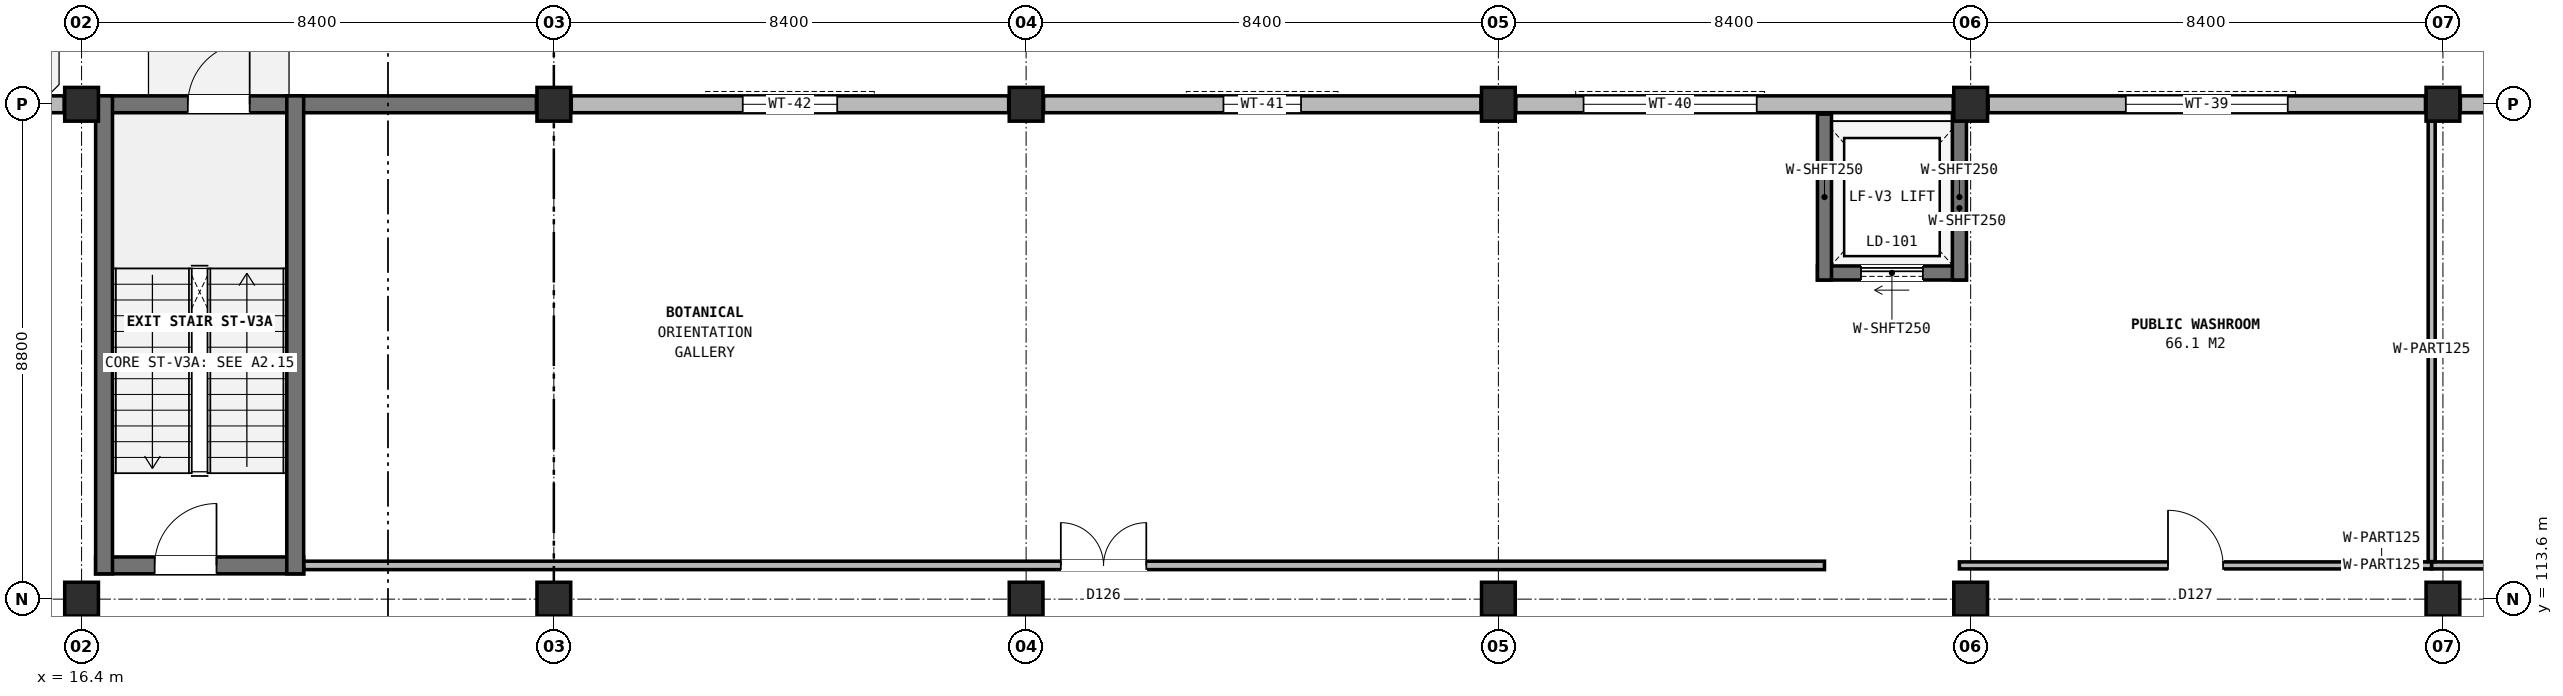
"""IFC4 building model, lengths in metres.
Left out: names, types, materials, properties, quantities, classifications, styles, units other than length and angle.
Written with IfcOpenShell. Run it as: python <this file> out.ifc"""

import sys

from ifc_helpers import new_model, si_unit, direction, frame, frame_2d, origin, origin_2d, place, context, subcontext, project, spatial, rectangle, extrude, element, fill, save


model = new_model("IFC4")
c1 = context("Model", 3, precision=1e-05, world=origin(), true_north=direction((0.0, 1.0)))
c2 = subcontext(c1, "Body", "Model", "MODEL_VIEW")
j1 = project(units=[si_unit("LENGTHUNIT", "METRE"), si_unit("PLANEANGLEUNIT", "RADIAN")], contexts=[c1])
p1 = place(None, origin())
s1 = spatial("IfcSite", under=j1, at=p1, CompositionType="ELEMENT")
p2 = place(p1, origin())
s2 = spatial("IfcBuilding", under=s1, at=p2, CompositionType="ELEMENT")
p3 = place(p2, origin())
s3 = spatial("IfcBuildingStorey", under=s2, at=p3, CompositionType="ELEMENT", Elevation=0.0)
for number, where, z_axis, x_axis in (
    (1, (16.4, 113.6, 0.0), (0.0, 0.0, 1.0), (1.0, 0.0, 0.0)),
    (2, (16.4, 122.4, 0.0), (0.0, 0.0, 1.0), (1.0, 0.0, 0.0)),
    (3, (24.8, 113.6, 0.0), (0.0, 0.0, 1.0), (1.0, 0.0, 0.0)),
    (4, (24.8, 122.4, 0.0), (0.0, 0.0, 1.0), (1.0, 0.0, 0.0)),
    (5, (33.2, 113.6, 0.0), (0.0, 0.0, 1.0), (1.0, 0.0, 0.0)),
    (6, (33.2, 122.4, 0.0), (0.0, 0.0, 1.0), (1.0, 0.0, 0.0)),
    (7, (41.6, 113.6, 0.0), (0.0, 0.0, 1.0), (1.0, 0.0, 0.0)),
    (8, (41.6, 122.4, 0.0), (0.0, 0.0, 1.0), (1.0, 0.0, 0.0)),
    (9, (50.0, 113.6, 0.0), (0.0, 0.0, 1.0), (1.0, 0.0, 0.0)),
    (10, (50.0, 122.4, 0.0), (0.0, 0.0, 1.0), (1.0, 0.0, 0.0)),
    (11, (58.4, 113.6, 0.0), (0.0, 0.0, 1.0), (1.0, 0.0, 0.0)),
    (12, (58.4, 122.4, 0.0), (0.0, 0.0, 1.0), (1.0, 0.0, 0.0)),
):
    element("IfcColumn", number, at=place(p3, frame(where, z_axis=z_axis, x_axis=x_axis)), inside=s3, PredefinedType="COLUMN", context=c2, shape_type="SweptSolid", body=[
        extrude(rectangle(XDim=0.6, YDim=0.6, at=origin_2d()), origin(), (0.0, 0.0, 1.0), 4.8),
    ])
p4 = place(p3, frame((66.49, 122.4, 0.0), z_axis=(0.0, 0.0, 1.0), x_axis=(-1.0, 0.0, 0.0)))
e13 = element("IfcWall", 13, at=p4, inside=s3, PredefinedType="SOLIDWALL", context=c2, shape_type="SweptSolid", body=[
    extrude(rectangle(XDim=7.78, YDim=0.3, at=frame_2d((3.89, 0.0))), origin(), (0.0, 0.0, 1.0), 4.05),
])
p5 = place(p4, frame((2.55, 0.0, 0.9)))
e14 = element("IfcOpeningElement", 14, at=p5, cuts=e13, PredefinedType="OPENING", context=c2, shape_type="SweptSolid", body=[
    extrude(rectangle(XDim=2.68, YDim=2.12, at=frame_2d((1.34, 1.06))), frame((0.0, 0.16, 0.0), z_axis=(0.0, -1.0, 0.0), x_axis=(1.0, 0.0, 0.0)), (0.0, 0.0, 1.0), 0.32),
])
p6 = place(p3, frame((58.09, 122.4, 0.0), z_axis=(0.0, 0.0, 1.0), x_axis=(-1.0, 0.0, 0.0)))
e15 = element("IfcWall", 15, at=p6, inside=s3, PredefinedType="SOLIDWALL", context=c2, shape_type="SweptSolid", body=[
    extrude(rectangle(XDim=7.78, YDim=0.3, at=frame_2d((3.89, 0.0))), origin(), (0.0, 0.0, 1.0), 4.05),
])
p7 = place(p6, frame((2.45, 0.0, 0.9)))
e16 = element("IfcOpeningElement", 16, at=p7, cuts=e15, PredefinedType="OPENING", context=c2, shape_type="SweptSolid", body=[
    extrude(rectangle(XDim=2.88, YDim=2.14, at=frame_2d((1.44, 1.07))), frame((0.0, 0.16, 0.0), z_axis=(0.0, -1.0, 0.0), x_axis=(1.0, 0.0, 0.0)), (0.0, 0.0, 1.0), 0.32),
])
p8 = place(p3, frame((49.69, 122.4, 0.0), z_axis=(0.0, 0.0, 1.0), x_axis=(-1.0, 0.0, 0.0)))
e17 = element("IfcWall", 17, at=p8, inside=s3, PredefinedType="SOLIDWALL", context=c2, shape_type="SweptSolid", body=[
    extrude(rectangle(XDim=7.78, YDim=0.3, at=frame_2d((3.89, 0.0))), origin(), (0.0, 0.0, 1.0), 4.05),
])
p9 = place(p8, frame((3.495, 0.0, 0.9)))
e18 = element("IfcOpeningElement", 18, at=p9, cuts=e17, PredefinedType="OPENING", context=c2, shape_type="SweptSolid", body=[
    extrude(rectangle(XDim=3.08, YDim=2.18, at=frame_2d((1.54, 1.09))), frame((0.0, 0.16, 0.0), z_axis=(0.0, -1.0, 0.0), x_axis=(1.0, 0.0, 0.0)), (0.0, 0.0, 1.0), 0.32),
])
p10 = place(p3, frame((41.29, 122.4, 0.0), z_axis=(0.0, 0.0, 1.0), x_axis=(-1.0, 0.0, 0.0)))
e19 = element("IfcWall", 19, at=p10, inside=s3, PredefinedType="SOLIDWALL", context=c2, shape_type="SweptSolid", body=[
    extrude(rectangle(XDim=7.78, YDim=0.3, at=frame_2d((3.89, 0.0))), origin(), (0.0, 0.0, 1.0), 4.05),
])
p11 = place(p10, frame((3.2, 0.0, 0.9)))
e20 = element("IfcOpeningElement", 20, at=p11, cuts=e19, PredefinedType="OPENING", context=c2, shape_type="SweptSolid", body=[
    extrude(rectangle(XDim=1.38, YDim=2.24, at=frame_2d((0.69, 1.12))), frame((0.0, 0.16, 0.0), z_axis=(0.0, -1.0, 0.0), x_axis=(1.0, 0.0, 0.0)), (0.0, 0.0, 1.0), 0.32),
])
p12 = place(p3, frame((32.89, 122.4, 0.0), z_axis=(0.0, 0.0, 1.0), x_axis=(-1.0, 0.0, 0.0)))
e21 = element("IfcWall", 21, at=p12, inside=s3, PredefinedType="SOLIDWALL", context=c2, shape_type="SweptSolid", body=[
    extrude(rectangle(XDim=7.78, YDim=0.3, at=frame_2d((3.89, 0.0))), origin(), (0.0, 0.0, 1.0), 4.05),
])
p13 = place(p12, frame((3.05, 0.0, 0.9)))
e22 = element("IfcOpeningElement", 22, at=p13, cuts=e21, PredefinedType="OPENING", context=c2, shape_type="SweptSolid", body=[
    extrude(rectangle(XDim=1.68, YDim=2.28, at=frame_2d((0.84, 1.14))), frame((0.0, 0.16, 0.0), z_axis=(0.0, -1.0, 0.0), x_axis=(1.0, 0.0, 0.0)), (0.0, 0.0, 1.0), 0.32),
])
p14 = place(p3, frame((24.49, 122.4, 0.0), z_axis=(0.0, 0.0, 1.0), x_axis=(-1.0, 0.0, 0.0)))
e23 = element("IfcWall", 23, at=p14, inside=s3, PredefinedType="SHEAR", context=c2, shape_type="SweptSolid", body=[
    extrude(rectangle(XDim=7.78, YDim=0.3, at=frame_2d((3.89, 0.0))), origin(), (0.0, 0.0, 1.0), 4.05),
])
p15 = place(p14, frame((5.1, 0.0, 0.0)))
e24 = element("IfcOpeningElement", 24, at=p15, cuts=e23, PredefinedType="OPENING", context=c2, shape_type="SweptSolid", body=[
    extrude(rectangle(XDim=1.1, YDim=2.2, at=frame_2d((0.55, 1.1))), frame((0.0, 0.16, 0.0), z_axis=(0.0, -1.0, 0.0), x_axis=(1.0, 0.0, 0.0)), (0.0, 0.0, 1.0), 0.32),
])
p16 = place(p3, frame((16.09, 122.4, 0.0), z_axis=(0.0, 0.0, 1.0), x_axis=(-1.0, 0.0, 0.0)))
e25 = element("IfcWall", 25, at=p16, inside=s3, PredefinedType="SOLIDWALL", context=c2, shape_type="SweptSolid", body=[
    extrude(rectangle(XDim=7.78, YDim=0.3, at=frame_2d((3.89, 0.0))), origin(), (0.0, 0.0, 1.0), 4.15),
])
p17 = place(p16, frame((1.49, 0.0, 0.0)))
e26 = element("IfcOpeningElement", 26, at=p17, cuts=e25, PredefinedType="OPENING", context=c2, shape_type="SweptSolid", body=[
    extrude(rectangle(XDim=4.8, YDim=3.2, at=frame_2d((2.4, 1.6))), frame((0.0, 0.16, 0.0), z_axis=(0.0, -1.0, 0.0), x_axis=(1.0, 0.0, 0.0)), (0.0, 0.0, 1.0), 0.32),
])
p18 = place(p3, frame((16.65, 114.2, 0.0), z_axis=(0.0, 0.0, 1.0), x_axis=(1.0, 0.0, 0.0)))
e27 = element("IfcWall", 27, at=p18, inside=s3, PredefinedType="SHEAR", context=c2, shape_type="SweptSolid", body=[
    extrude(rectangle(XDim=3.7, YDim=0.3, at=frame_2d((1.85, 0.0))), origin(), (0.0, 0.0, 1.0), 4.8),
])
p19 = place(p18, frame((1.05, 0.0, 0.0)))
e28 = element("IfcOpeningElement", 28, at=p19, cuts=e27, PredefinedType="OPENING", context=c2, shape_type="SweptSolid", body=[
    extrude(rectangle(XDim=1.1, YDim=2.2, at=frame_2d((0.55, 1.1))), frame((0.0, 0.16, 0.0), z_axis=(0.0, -1.0, 0.0), x_axis=(1.0, 0.0, 0.0)), (0.0, 0.0, 1.0), 0.32),
])
for number, where, z_axis, x_axis in (
    (29, (16.8, 114.05, 0.0), (0.0, 0.0, 1.0), (0.0, 1.0, 0.0)),
    (30, (20.2, 114.05, 0.0), (0.0, 0.0, 1.0), (0.0, 1.0, 0.0)),
):
    element("IfcWall", number, at=place(p3, frame(where, z_axis=z_axis, x_axis=x_axis)), inside=s3, PredefinedType="SHEAR", context=c2, shape_type="SweptSolid", body=[
        extrude(rectangle(XDim=8.5, YDim=0.3, at=frame_2d((4.25, 0.0))), origin(), (0.0, 0.0, 1.0), 4.8),
    ])
p20 = place(p3, frame((47.275, 119.4, 0.0), z_axis=(0.0, 0.0, 1.0), x_axis=(1.0, 0.0, 0.0)))
e31 = element("IfcWall", 31, at=p20, inside=s3, PredefinedType="SOLIDWALL", context=c2, shape_type="SweptSolid", body=[
    extrude(rectangle(XDim=2.65, YDim=0.25, at=frame_2d((1.325, 0.0))), origin(), (0.0, 0.0, 1.0), 4.48),
])
p21 = place(p20, frame((0.775, 0.0, 0.0)))
e32 = element("IfcOpeningElement", 32, at=p21, cuts=e31, PredefinedType="OPENING", context=c2, shape_type="SweptSolid", body=[
    extrude(rectangle(XDim=1.1, YDim=2.2, at=frame_2d((0.55, 1.1))), frame((0.0, 0.135, 0.0), z_axis=(0.0, -1.0, 0.0), x_axis=(1.0, 0.0, 0.0)), (0.0, 0.0, 1.0), 0.27),
])
for number, where, z_axis, x_axis in (
    (33, (47.4, 119.275, 0.0), (0.0, 0.0, 1.0), (0.0, 1.0, 0.0)),
    (34, (49.8, 119.275, 0.0), (0.0, 0.0, 1.0), (0.0, 1.0, 0.0)),
):
    element("IfcWall", number, at=place(p3, frame(where, z_axis=z_axis, x_axis=x_axis)), inside=s3, PredefinedType="SOLIDWALL", context=c2, shape_type="SweptSolid", body=[
        extrude(rectangle(XDim=2.95, YDim=0.25, at=frame_2d((1.475, 0.0))), origin(), (0.0, 0.0, 1.0), 4.48),
    ])
p22 = place(p3, frame((20.355, 114.2, 0.0), z_axis=(0.0, 0.0, 1.0), x_axis=(1.0, 0.0, 0.0)))
e35 = element("IfcWall", 35, at=p22, inside=s3, PredefinedType="PARTITIONING", context=c2, shape_type="SweptSolid", body=[
    extrude(rectangle(XDim=27.045, YDim=0.15, at=frame_2d((13.522, 0.0))), origin(), (0.0, 0.0, 1.0), 4.465),
])
p23 = place(p22, frame((13.462, 0.0, 0.0)))
e36 = element("IfcOpeningElement", 36, at=p23, cuts=e35, PredefinedType="OPENING", context=c2, shape_type="SweptSolid", body=[
    extrude(rectangle(XDim=1.52, YDim=2.28, at=frame_2d((0.76, 1.14))), frame((0.0, 0.085, 0.0), z_axis=(0.0, -1.0, 0.0), x_axis=(1.0, 0.0, 0.0)), (0.0, 0.0, 1.0), 0.17),
])
p24 = place(p3, frame((49.8, 114.2, 0.0), z_axis=(0.0, 0.0, 1.0), x_axis=(1.0, 0.0, 0.0)))
e37 = element("IfcWall", 37, at=p24, inside=s3, PredefinedType="PARTITIONING", context=c2, shape_type="SweptSolid", body=[
    extrude(rectangle(XDim=8.4, YDim=0.125, at=frame_2d((4.2, 0.0))), origin(), (0.0, 0.0, 1.0), 4.465),
])
p25 = place(p24, frame((3.71, 0.0, 0.0)))
e38 = element("IfcOpeningElement", 38, at=p25, cuts=e37, PredefinedType="OPENING", context=c2, shape_type="SweptSolid", body=[
    extrude(rectangle(XDim=0.98, YDim=2.1, at=frame_2d((0.49, 1.05))), frame((0.0, 0.073, 0.0), z_axis=(0.0, -1.0, 0.0), x_axis=(1.0, 0.0, 0.0)), (0.0, 0.0, 1.0), 0.145),
])
p26 = place(p3, frame((58.2, 114.2, 0.0), z_axis=(0.0, 0.0, 1.0), x_axis=(1.0, 0.0, 0.0)))
e39 = element("IfcWall", 39, at=p26, inside=s3, PredefinedType="PARTITIONING", context=c2, shape_type="SweptSolid", body=[
    extrude(rectangle(XDim=8.4, YDim=0.125, at=frame_2d((4.2, 0.0))), origin(), (0.0, 0.0, 1.0), 4.465),
])
p27 = place(p26, frame((3.71, 0.0, 0.0)))
e40 = element("IfcOpeningElement", 40, at=p27, cuts=e39, PredefinedType="OPENING", context=c2, shape_type="SweptSolid", body=[
    extrude(rectangle(XDim=0.98, YDim=2.1, at=frame_2d((0.49, 1.05))), frame((0.0, 0.073, 0.0), z_axis=(0.0, -1.0, 0.0), x_axis=(1.0, 0.0, 0.0)), (0.0, 0.0, 1.0), 0.145),
])
p28 = place(p3, frame((58.2, 114.268, 0.0), z_axis=(0.0, 0.0, 1.0), x_axis=(0.0, 1.0, 0.0)))
e41 = element("IfcWall", 41, at=p28, inside=s3, PredefinedType="PARTITIONING", context=c2, shape_type="SweptSolid", body=[
    extrude(rectangle(XDim=7.833, YDim=0.125, at=frame_2d((3.916, 0.0))), origin(), (0.0, 0.0, 1.0), 4.045),
])
p29 = place(p7, origin())
e42 = element("IfcWindow", 42, at=p29, inside=s3, PartitioningType="SINGLE_PANEL", PredefinedType="WINDOW", context=c2, shape_type="SweptSolid", body=[
    extrude(rectangle(XDim=2.88, YDim=2.14, at=frame_2d((1.44, 1.07))), frame((0.0, 0.03, 0.0), z_axis=(0.0, -1.0, 0.0), x_axis=(1.0, 0.0, 0.0)), (0.0, 0.0, 1.0), 0.06),
])
fill(e16, e42)
p30 = place(p9, origin())
e43 = element("IfcWindow", 43, at=p30, inside=s3, PartitioningType="SINGLE_PANEL", PredefinedType="WINDOW", context=c2, shape_type="SweptSolid", body=[
    extrude(rectangle(XDim=3.08, YDim=2.18, at=frame_2d((1.54, 1.09))), frame((0.0, 0.03, 0.0), z_axis=(0.0, -1.0, 0.0), x_axis=(1.0, 0.0, 0.0)), (0.0, 0.0, 1.0), 0.06),
])
fill(e18, e43)
p31 = place(p11, origin())
e44 = element("IfcWindow", 44, at=p31, inside=s3, PartitioningType="SINGLE_PANEL", PredefinedType="WINDOW", context=c2, shape_type="SweptSolid", body=[
    extrude(rectangle(XDim=1.38, YDim=2.24, at=frame_2d((0.69, 1.12))), frame((0.0, 0.03, 0.0), z_axis=(0.0, -1.0, 0.0), x_axis=(1.0, 0.0, 0.0)), (0.0, 0.0, 1.0), 0.06),
])
fill(e20, e44)
p32 = place(p13, origin())
e45 = element("IfcWindow", 45, at=p32, inside=s3, PartitioningType="SINGLE_PANEL", PredefinedType="WINDOW", context=c2, shape_type="SweptSolid", body=[
    extrude(rectangle(XDim=1.68, YDim=2.28, at=frame_2d((0.84, 1.14))), frame((0.0, 0.03, 0.0), z_axis=(0.0, -1.0, 0.0), x_axis=(1.0, 0.0, 0.0)), (0.0, 0.0, 1.0), 0.06),
])
fill(e22, e45)
p33 = place(p15, frame((1.1, 0.0, 0.0), z_axis=(0.0, 0.0, 1.0), x_axis=(-1.0, 0.0, 0.0)))
e46 = element("IfcDoor", 46, at=p33, inside=s3, OperationType="SINGLE_SWING_LEFT", PredefinedType="DOOR", context=c2, shape_type="SweptSolid", body=[
    extrude(rectangle(XDim=1.1, YDim=2.2, at=frame_2d((0.55, 1.1))), frame((0.0, 0.025, 0.0), z_axis=(0.0, -1.0, 0.0), x_axis=(1.0, 0.0, 0.0)), (0.0, 0.0, 1.0), 0.05),
])
fill(e24, e46)
p34 = place(p19, origin())
e47 = element("IfcDoor", 47, at=p34, inside=s3, OperationType="SINGLE_SWING_RIGHT", PredefinedType="DOOR", context=c2, shape_type="SweptSolid", body=[
    extrude(rectangle(XDim=1.1, YDim=2.2, at=frame_2d((0.55, 1.1))), frame((0.0, 0.025, 0.0), z_axis=(0.0, -1.0, 0.0), x_axis=(1.0, 0.0, 0.0)), (0.0, 0.0, 1.0), 0.05),
])
fill(e28, e47)
p35 = place(p21, origin())
e48 = element("IfcDoor", 48, at=p35, inside=s3, OperationType="SLIDING_TO_LEFT", PredefinedType="DOOR", context=c2, shape_type="SweptSolid", body=[
    extrude(rectangle(XDim=1.1, YDim=2.2, at=frame_2d((0.55, 1.1))), frame((0.0, 0.025, 0.0), z_axis=(0.0, -1.0, 0.0), x_axis=(1.0, 0.0, 0.0)), (0.0, 0.0, 1.0), 0.05),
])
fill(e32, e48)
p36 = place(p23, origin())
e49 = element("IfcDoor", 49, at=p36, inside=s3, OperationType="DOUBLE_DOOR_SINGLE_SWING", PredefinedType="DOOR", context=c2, shape_type="SweptSolid", body=[
    extrude(rectangle(XDim=1.52, YDim=2.28, at=frame_2d((0.76, 1.14))), frame((0.0, 0.025, 0.0), z_axis=(0.0, -1.0, 0.0), x_axis=(1.0, 0.0, 0.0)), (0.0, 0.0, 1.0), 0.05),
])
fill(e36, e49)
p37 = place(p25, origin())
e50 = element("IfcDoor", 50, at=p37, inside=s3, OperationType="SINGLE_SWING_LEFT", PredefinedType="DOOR", context=c2, shape_type="SweptSolid", body=[
    extrude(rectangle(XDim=0.98, YDim=2.1, at=frame_2d((0.49, 1.05))), frame((0.0, 0.025, 0.0), z_axis=(0.0, -1.0, 0.0), x_axis=(1.0, 0.0, 0.0)), (0.0, 0.0, 1.0), 0.05),
])
fill(e38, e50)
save(model, sys.argv[1])
